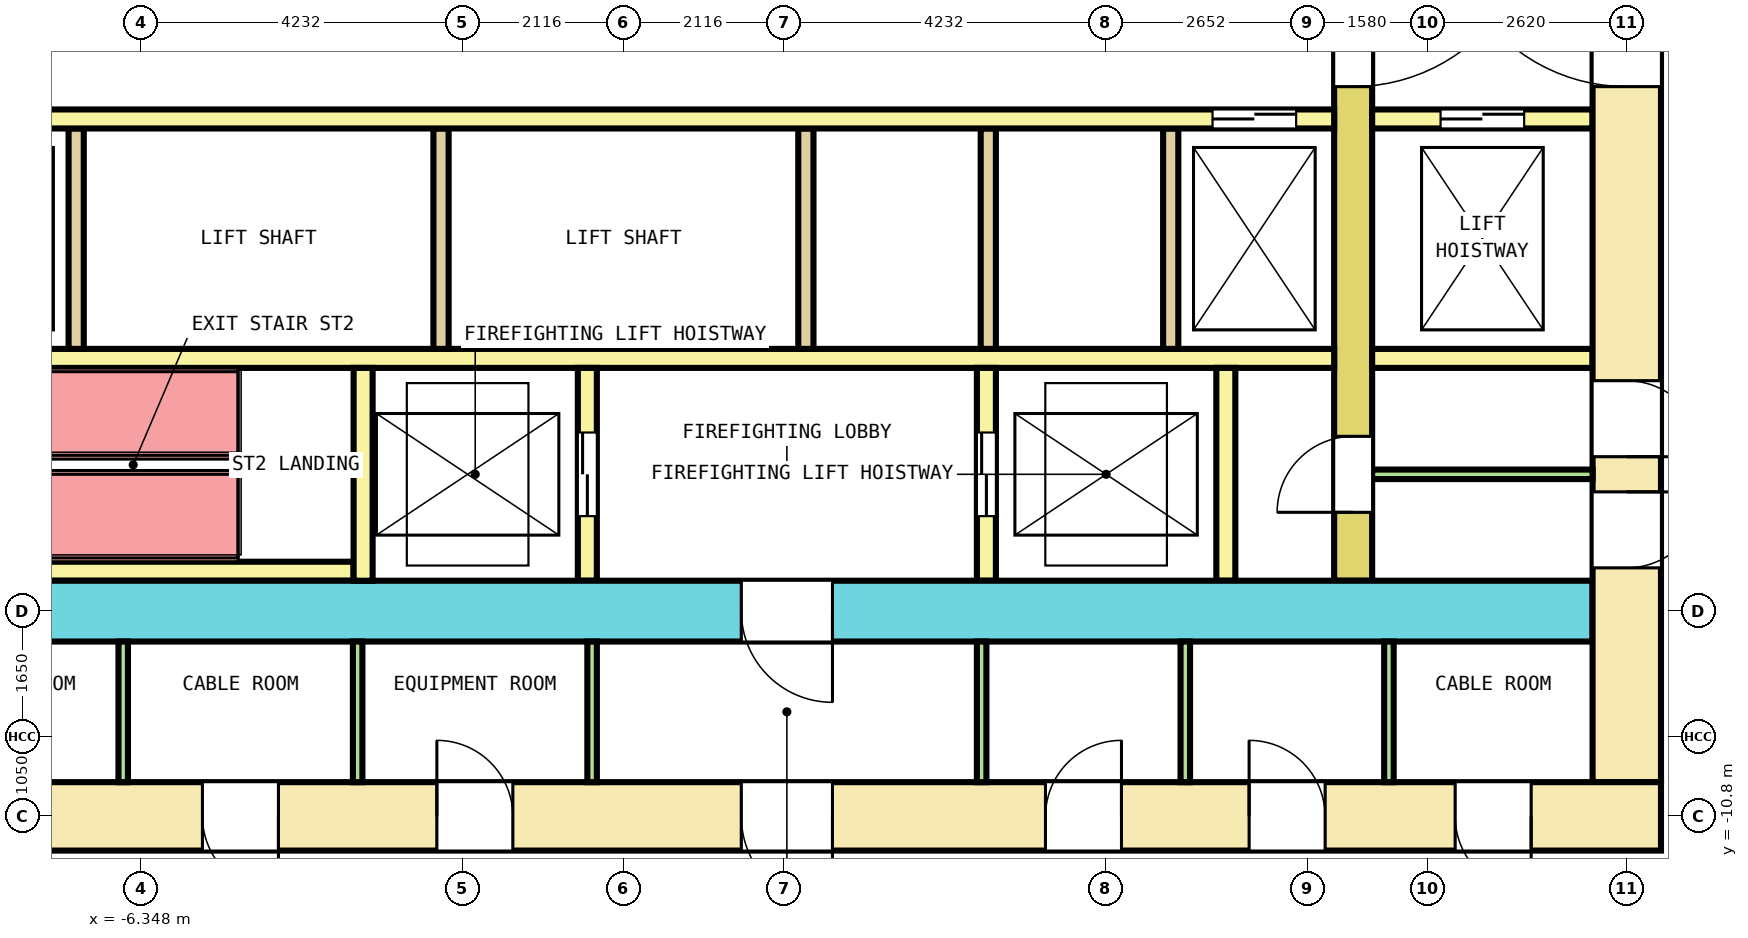
"""IFC4 building model, lengths in metres.
Left out: names, types, materials, properties, quantities, classifications, styles, units other than length and angle.
Written with IfcOpenShell. Run it as: python <this file> out.ifc"""

import sys

from ifc_helpers import new_model, si_unit, direction, frame, frame_2d, origin, place, context, subcontext, project, spatial, rectangle, extrude, element, fill, save


model = new_model("IFC4")
c1 = context("Model", 3, precision=1e-05, world=origin(), true_north=direction((0.0, 1.0)))
c2 = subcontext(c1, "Body", "Model", "MODEL_VIEW")
j1 = project(units=[si_unit("LENGTHUNIT", "METRE"), si_unit("PLANEANGLEUNIT", "RADIAN")], contexts=[c1])
p1 = place(None, origin())
s1 = spatial("IfcSite", under=j1, at=p1, CompositionType="ELEMENT")
p2 = place(p1, origin())
s2 = spatial("IfcBuilding", under=s1, at=p2, CompositionType="ELEMENT")
p3 = place(p2, frame((0.0, 0.0, 63.0)))
s3 = spatial("IfcBuildingStorey", under=s2, at=p3, CompositionType="ELEMENT", Elevation=63.0)
p4 = place(p3, frame((-13.65, -10.8, 0.0), z_axis=(0.0, 0.0, 1.0), x_axis=(1.0, 0.0, 0.0)))
e1 = element("IfcWall", 1, at=p4, inside=s3, PredefinedType="SHEAR", context=c2, shape_type="SweptSolid", body=[
    extrude(rectangle(XDim=27.3, YDim=0.9, at=frame_2d((13.65, 0.0))), origin(), (0.0, 0.0, 1.0), 4.1),
])
p5 = place(p4, frame((1.911, 0.0, 0.0)))
e2 = element("IfcOpeningElement", 2, at=p5, cuts=e1, PredefinedType="OPENING", context=c2, shape_type="SweptSolid", body=[
    extrude(rectangle(XDim=1.0, YDim=2.1, at=frame_2d((0.5, 1.05))), frame((0.0, 0.46, 0.0), z_axis=(0.0, -1.0, 0.0), x_axis=(1.0, 0.0, 0.0)), (0.0, 0.0, 1.0), 0.92),
])
p6 = place(p4, frame((5.027, 0.0, 0.0)))
e3 = element("IfcOpeningElement", 3, at=p6, cuts=e1, PredefinedType="OPENING", context=c2, shape_type="SweptSolid", body=[
    extrude(rectangle(XDim=1.0, YDim=2.1, at=frame_2d((0.5, 1.05))), frame((0.0, 0.46, 0.0), z_axis=(0.0, -1.0, 0.0), x_axis=(1.0, 0.0, 0.0)), (0.0, 0.0, 1.0), 0.92),
])
p7 = place(p4, frame((8.111, 0.0, 0.0)))
e4 = element("IfcOpeningElement", 4, at=p7, cuts=e1, PredefinedType="OPENING", context=c2, shape_type="SweptSolid", body=[
    extrude(rectangle(XDim=1.0, YDim=2.1, at=frame_2d((0.5, 1.05))), frame((0.0, 0.46, 0.0), z_axis=(0.0, -1.0, 0.0), x_axis=(1.0, 0.0, 0.0)), (0.0, 0.0, 1.0), 0.92),
])
p8 = place(p4, frame((11.195, 0.0, 0.0)))
e5 = element("IfcOpeningElement", 5, at=p8, cuts=e1, PredefinedType="OPENING", context=c2, shape_type="SweptSolid", body=[
    extrude(rectangle(XDim=1.0, YDim=2.1, at=frame_2d((0.5, 1.05))), frame((0.0, 0.46, 0.0), z_axis=(0.0, -1.0, 0.0), x_axis=(1.0, 0.0, 0.0)), (0.0, 0.0, 1.0), 0.92),
])
p9 = place(p4, frame((19.202, 0.0, 0.0)))
e6 = element("IfcOpeningElement", 6, at=p9, cuts=e1, PredefinedType="OPENING", context=c2, shape_type="SweptSolid", body=[
    extrude(rectangle(XDim=1.0, YDim=2.1, at=frame_2d((0.5, 1.05))), frame((0.0, 0.46, 0.0), z_axis=(0.0, -1.0, 0.0), x_axis=(1.0, 0.0, 0.0)), (0.0, 0.0, 1.0), 0.92),
])
p10 = place(p4, frame((21.881, 0.0, 0.0)))
e7 = element("IfcOpeningElement", 7, at=p10, cuts=e1, PredefinedType="OPENING", context=c2, shape_type="SweptSolid", body=[
    extrude(rectangle(XDim=1.0, YDim=2.1, at=frame_2d((0.5, 1.05))), frame((0.0, 0.46, 0.0), z_axis=(0.0, -1.0, 0.0), x_axis=(1.0, 0.0, 0.0)), (0.0, 0.0, 1.0), 0.92),
])
p11 = place(p4, frame((24.592, 0.0, 0.0)))
e8 = element("IfcOpeningElement", 8, at=p11, cuts=e1, PredefinedType="OPENING", context=c2, shape_type="SweptSolid", body=[
    extrude(rectangle(XDim=1.0, YDim=2.1, at=frame_2d((0.5, 1.05))), frame((0.0, 0.46, 0.0), z_axis=(0.0, -1.0, 0.0), x_axis=(1.0, 0.0, 0.0)), (0.0, 0.0, 1.0), 0.92),
])
p12 = place(p4, frame((15.2, 0.0, 0.0)))
e9 = element("IfcOpeningElement", 9, at=p12, cuts=e1, PredefinedType="OPENING", context=c2, shape_type="SweptSolid", body=[
    extrude(rectangle(XDim=1.2, YDim=2.1, at=frame_2d((0.6, 1.05))), frame((0.0, 0.46, 0.0), z_axis=(0.0, -1.0, 0.0), x_axis=(1.0, 0.0, 0.0)), (0.0, 0.0, 1.0), 0.92),
])
p13 = place(p3, frame((13.2, -10.35, 0.0), z_axis=(0.0, 0.0, 1.0), x_axis=(0.0, 1.0, 0.0)))
e10 = element("IfcWall", 10, at=p13, inside=s3, PredefinedType="SHEAR", context=c2, shape_type="SweptSolid", body=[
    extrude(rectangle(XDim=20.7, YDim=0.9, at=frame_2d((10.35, 0.0))), origin(), (0.0, 0.0, 1.0), 4.1),
])
p14 = place(p13, frame((9.15, 0.0, 0.0)))
e11 = element("IfcOpeningElement", 11, at=p14, cuts=e10, PredefinedType="OPENING", context=c2, shape_type="SweptSolid", body=[
    extrude(rectangle(XDim=2.4, YDim=2.1, at=frame_2d((1.2, 1.05))), frame((0.0, 0.46, 0.0), z_axis=(0.0, -1.0, 0.0), x_axis=(1.0, 0.0, 0.0)), (0.0, 0.0, 1.0), 0.92),
])
p15 = place(p13, frame((16.05, 0.0, 0.0)))
e12 = element("IfcOpeningElement", 12, at=p15, cuts=e10, PredefinedType="OPENING", context=c2, shape_type="SweptSolid", body=[
    extrude(rectangle(XDim=1.2, YDim=2.1, at=frame_2d((0.6, 1.05))), frame((0.0, 0.46, 0.0), z_axis=(0.0, -1.0, 0.0), x_axis=(1.0, 0.0, 0.0)), (0.0, 0.0, 1.0), 0.92),
])
p16 = place(p13, frame((2.819, 0.0, 0.0)))
e13 = element("IfcOpeningElement", 13, at=p16, cuts=e10, PredefinedType="OPENING", context=c2, shape_type="SweptSolid", body=[
    extrude(rectangle(XDim=1.0, YDim=2.1, at=frame_2d((0.5, 1.05))), frame((0.0, 0.46, 0.0), z_axis=(0.0, -1.0, 0.0), x_axis=(1.0, 0.0, 0.0)), (0.0, 0.0, 1.0), 0.92),
])
p17 = place(p13, frame((4.281, 0.0, 0.0)))
e14 = element("IfcOpeningElement", 14, at=p17, cuts=e10, PredefinedType="OPENING", context=c2, shape_type="SweptSolid", body=[
    extrude(rectangle(XDim=1.0, YDim=2.1, at=frame_2d((0.5, 1.05))), frame((0.0, 0.46, 0.0), z_axis=(0.0, -1.0, 0.0), x_axis=(1.0, 0.0, 0.0)), (0.0, 0.0, 1.0), 0.92),
])
p18 = place(p3, frame((-12.75, -8.1, 0.0), z_axis=(0.0, 0.0, 1.0), x_axis=(1.0, 0.0, 0.0)))
e15 = element("IfcWall", 15, at=p18, inside=s3, PredefinedType="SHEAR", context=c2, shape_type="SweptSolid", body=[
    extrude(rectangle(XDim=25.5, YDim=0.8, at=frame_2d((12.75, 0.0))), origin(), (0.0, 0.0, 1.0), 4.1),
])
p19 = place(p18, frame((14.3, 0.0, 0.0)))
e16 = element("IfcOpeningElement", 16, at=p19, cuts=e15, PredefinedType="OPENING", context=c2, shape_type="SweptSolid", body=[
    extrude(rectangle(XDim=1.2, YDim=2.1, at=frame_2d((0.6, 1.05))), frame((0.0, 0.41, 0.0), z_axis=(0.0, -1.0, 0.0), x_axis=(1.0, 0.0, 0.0)), (0.0, 0.0, 1.0), 0.82),
])
p20 = place(p3, frame((9.6, -7.7, 0.0), z_axis=(0.0, 0.0, 1.0), x_axis=(0.0, 1.0, 0.0)))
e17 = element("IfcWall", 17, at=p20, inside=s3, PredefinedType="SHEAR", context=c2, shape_type="SweptSolid", body=[
    extrude(rectangle(XDim=15.4, YDim=0.5, at=frame_2d((7.7, 0.0))), origin(), (0.0, 0.0, 1.0), 4.1),
])
p21 = place(p20, frame((6.5, 0.0, 0.0)))
e18 = element("IfcOpeningElement", 18, at=p21, cuts=e17, PredefinedType="OPENING", context=c2, shape_type="SweptSolid", body=[
    extrude(rectangle(XDim=2.4, YDim=2.1, at=frame_2d((1.2, 1.05))), frame((0.0, 0.26, 0.0), z_axis=(0.0, -1.0, 0.0), x_axis=(1.0, 0.0, 0.0)), (0.0, 0.0, 1.0), 0.52),
])
p22 = place(p20, frame((13.4, 0.0, 0.0)))
e19 = element("IfcOpeningElement", 19, at=p22, cuts=e17, PredefinedType="OPENING", context=c2, shape_type="SweptSolid", body=[
    extrude(rectangle(XDim=1.2, YDim=2.1, at=frame_2d((0.6, 1.05))), frame((0.0, 0.26, 0.0), z_axis=(0.0, -1.0, 0.0), x_axis=(1.0, 0.0, 0.0)), (0.0, 0.0, 1.0), 0.52),
])
p23 = place(p20, frame((0.9, 0.0, 0.0)))
e20 = element("IfcOpeningElement", 20, at=p23, cuts=e17, PredefinedType="OPENING", context=c2, shape_type="SweptSolid", body=[
    extrude(rectangle(XDim=1.0, YDim=2.1, at=frame_2d((0.5, 1.05))), frame((0.0, 0.26, 0.0), z_axis=(0.0, -1.0, 0.0), x_axis=(1.0, 0.0, 0.0)), (0.0, 0.0, 1.0), 0.52),
])
p24 = place(p3, frame((-9.35, -1.625, 0.0), z_axis=(0.0, 0.0, 1.0), x_axis=(1.0, 0.0, 0.0)))
e21 = element("IfcWall", 21, at=p24, inside=s3, PredefinedType="SOLIDWALL", context=c2, shape_type="SweptSolid", body=[
    extrude(rectangle(XDim=18.7, YDim=0.25, at=frame_2d((9.35, 0.0))), origin(), (0.0, 0.0, 1.0), 4.1),
])
p25 = place(p24, frame((0.5, 0.0, 0.0)))
e22 = element("IfcOpeningElement", 22, at=p25, cuts=e21, PredefinedType="OPENING", context=c2, shape_type="SweptSolid", body=[
    extrude(rectangle(XDim=1.1, YDim=2.1, at=frame_2d((0.55, 1.05))), frame((0.0, 0.135, 0.0), z_axis=(0.0, -1.0, 0.0), x_axis=(1.0, 0.0, 0.0)), (0.0, 0.0, 1.0), 0.27),
])
p26 = place(p24, frame((17.1, 0.0, 0.0)))
e23 = element("IfcOpeningElement", 23, at=p26, cuts=e21, PredefinedType="OPENING", context=c2, shape_type="SweptSolid", body=[
    extrude(rectangle(XDim=1.1, YDim=2.1, at=frame_2d((0.55, 1.05))), frame((0.0, 0.135, 0.0), z_axis=(0.0, -1.0, 0.0), x_axis=(1.0, 0.0, 0.0)), (0.0, 0.0, 1.0), 0.27),
])
p27 = place(p3, frame((9.85, -1.625, 0.0), z_axis=(0.0, 0.0, 1.0), x_axis=(1.0, 0.0, 0.0)))
e24 = element("IfcWall", 24, at=p27, inside=s3, PredefinedType="SOLIDWALL", context=c2, shape_type="SweptSolid", body=[
    extrude(rectangle(XDim=2.9, YDim=0.25, at=frame_2d((1.45, 0.0))), origin(), (0.0, 0.0, 1.0), 4.1),
])
p28 = place(p27, frame((0.9, 0.0, 0.0)))
e25 = element("IfcOpeningElement", 25, at=p28, cuts=e24, PredefinedType="OPENING", context=c2, shape_type="SweptSolid", body=[
    extrude(rectangle(XDim=1.1, YDim=2.1, at=frame_2d((0.55, 1.05))), frame((0.0, 0.135, 0.0), z_axis=(0.0, -1.0, 0.0), x_axis=(1.0, 0.0, 0.0)), (0.0, 0.0, 1.0), 0.27),
])
p29 = place(p3, frame((-9.35, -4.775, 0.0), z_axis=(0.0, 0.0, 1.0), x_axis=(1.0, 0.0, 0.0)))
e26 = element("IfcWall", 26, at=p29, inside=s3, PredefinedType="SOLIDWALL", context=c2, shape_type="SweptSolid", body=[
    extrude(rectangle(XDim=18.7, YDim=0.25, at=frame_2d((9.35, 0.0))), origin(), (0.0, 0.0, 1.0), 4.1),
])
p30 = place(p3, frame((9.85, -4.775, 0.0), z_axis=(0.0, 0.0, 1.0), x_axis=(1.0, 0.0, 0.0)))
e27 = element("IfcWall", 27, at=p30, inside=s3, PredefinedType="SOLIDWALL", context=c2, shape_type="SweptSolid", body=[
    extrude(rectangle(XDim=2.9, YDim=0.25, at=frame_2d((1.45, 0.0))), origin(), (0.0, 0.0, 1.0), 4.1),
])
for number, where, z_axis, x_axis in (
    (28, (-7.2, -4.65, 0.0), (0.0, 0.0, 1.0), (0.0, 1.0, 0.0)),
    (29, (-2.4, -4.65, 0.0), (0.0, 0.0, 1.0), (0.0, 1.0, 0.0)),
    (30, (2.4, -4.65, 0.0), (0.0, 0.0, 1.0), (0.0, 1.0, 0.0)),
    (31, (4.8, -4.65, 0.0), (0.0, 0.0, 1.0), (0.0, 1.0, 0.0)),
    (32, (7.2, -4.65, 0.0), (0.0, 0.0, 1.0), (0.0, 1.0, 0.0)),
):
    element("IfcWall", number, at=place(p3, frame(where, z_axis=z_axis, x_axis=x_axis)), inside=s3, PredefinedType="SOLIDWALL", context=c2, shape_type="SweptSolid", body=[
        extrude(rectangle(XDim=2.9, YDim=0.2, at=frame_2d((1.45, 0.0))), origin(), (0.0, 0.0, 1.0), 4.1),
    ])
p31 = place(p3, frame((-9.35, -7.575, 0.0), z_axis=(0.0, 0.0, 1.0), x_axis=(1.0, 0.0, 0.0)))
e33 = element("IfcWall", 33, at=p31, inside=s3, PredefinedType="SOLIDWALL", context=c2, shape_type="SweptSolid", body=[
    extrude(rectangle(XDim=5.8, YDim=0.25, at=frame_2d((2.9, 0.0))), origin(), (0.0, 0.0, 1.0), 4.1),
])
p32 = place(p3, frame((-3.425, -7.7, 0.0), z_axis=(0.0, 0.0, 1.0), x_axis=(0.0, 1.0, 0.0)))
e34 = element("IfcWall", 34, at=p32, inside=s3, PredefinedType="SOLIDWALL", context=c2, shape_type="SweptSolid", body=[
    extrude(rectangle(XDim=2.8, YDim=0.25, at=frame_2d((1.4, 0.0))), origin(), (0.0, 0.0, 1.0), 4.1),
])
p33 = place(p3, frame((-0.475, -7.7, 0.0), z_axis=(0.0, 0.0, 1.0), x_axis=(0.0, 1.0, 0.0)))
e35 = element("IfcWall", 35, at=p33, inside=s3, PredefinedType="SOLIDWALL", context=c2, shape_type="SweptSolid", body=[
    extrude(rectangle(XDim=2.8, YDim=0.25, at=frame_2d((1.4, 0.0))), origin(), (0.0, 0.0, 1.0), 4.1),
])
p34 = place(p33, frame((0.85, 0.0, 0.0)))
e36 = element("IfcOpeningElement", 36, at=p34, cuts=e35, PredefinedType="OPENING", context=c2, shape_type="SweptSolid", body=[
    extrude(rectangle(XDim=1.1, YDim=2.1, at=frame_2d((0.55, 1.05))), frame((0.0, 0.135, 0.0), z_axis=(0.0, -1.0, 0.0), x_axis=(1.0, 0.0, 0.0)), (0.0, 0.0, 1.0), 0.27),
])
p35 = place(p3, frame((4.775, -7.7, 0.0), z_axis=(0.0, 0.0, 1.0), x_axis=(0.0, 1.0, 0.0)))
e37 = element("IfcWall", 37, at=p35, inside=s3, PredefinedType="SOLIDWALL", context=c2, shape_type="SweptSolid", body=[
    extrude(rectangle(XDim=2.8, YDim=0.25, at=frame_2d((1.4, 0.0))), origin(), (0.0, 0.0, 1.0), 4.1),
])
p36 = place(p35, frame((0.85, 0.0, 0.0)))
e38 = element("IfcOpeningElement", 38, at=p36, cuts=e37, PredefinedType="OPENING", context=c2, shape_type="SweptSolid", body=[
    extrude(rectangle(XDim=1.1, YDim=2.1, at=frame_2d((0.55, 1.05))), frame((0.0, 0.135, 0.0), z_axis=(0.0, -1.0, 0.0), x_axis=(1.0, 0.0, 0.0)), (0.0, 0.0, 1.0), 0.27),
])
p37 = place(p3, frame((7.925, -7.7, 0.0), z_axis=(0.0, 0.0, 1.0), x_axis=(0.0, 1.0, 0.0)))
e39 = element("IfcWall", 39, at=p37, inside=s3, PredefinedType="SOLIDWALL", context=c2, shape_type="SweptSolid", body=[
    extrude(rectangle(XDim=2.8, YDim=0.25, at=frame_2d((1.4, 0.0))), origin(), (0.0, 0.0, 1.0), 4.1),
])
p38 = place(p3, frame((9.85, -6.3, 0.0), z_axis=(0.0, 0.0, 1.0), x_axis=(1.0, 0.0, 0.0)))
e40 = element("IfcWall", 40, at=p38, inside=s3, PredefinedType="PARTITIONING", context=c2, shape_type="SweptSolid", body=[
    extrude(rectangle(XDim=2.9, YDim=0.125, at=frame_2d((1.45, 0.0))), origin(), (0.0, 0.0, 1.0), 4.1),
])
for number, where, z_axis, x_axis in (
    (41, (-6.581, -10.35, 0.0), (0.0, 0.0, 1.0), (0.0, 1.0, 0.0)),
    (42, (-3.497, -10.35, 0.0), (0.0, 0.0, 1.0), (0.0, 1.0, 0.0)),
    (43, (-0.413, -10.35, 0.0), (0.0, 0.0, 1.0), (0.0, 1.0, 0.0)),
    (44, (4.712, -10.35, 0.0), (0.0, 0.0, 1.0), (0.0, 1.0, 0.0)),
    (45, (7.392, -10.35, 0.0), (0.0, 0.0, 1.0), (0.0, 1.0, 0.0)),
    (46, (10.071, -10.35, 0.0), (0.0, 0.0, 1.0), (0.0, 1.0, 0.0)),
):
    element("IfcWall", number, at=place(p3, frame(where, z_axis=z_axis, x_axis=x_axis)), inside=s3, PredefinedType="PARTITIONING", context=c2, shape_type="SweptSolid", body=[
        extrude(rectangle(XDim=1.85, YDim=0.125, at=frame_2d((0.925, 0.0))), origin(), (0.0, 0.0, 1.0), 4.1),
    ])
p39 = place(p26, origin())
e47 = element("IfcDoor", 47, at=p39, inside=s3, OperationType="DOUBLE_DOOR_SLIDING", PredefinedType="DOOR", context=c2, shape_type="SweptSolid", body=[
    extrude(rectangle(XDim=1.1, YDim=2.1, at=frame_2d((0.55, 1.05))), frame((0.0, 0.075, 0.0), z_axis=(0.0, -1.0, 0.0), x_axis=(1.0, 0.0, 0.0)), (0.0, 0.0, 1.0), 0.15),
])
fill(e23, e47)
p40 = place(p28, origin())
e48 = element("IfcDoor", 48, at=p40, inside=s3, OperationType="DOUBLE_DOOR_SLIDING", PredefinedType="DOOR", context=c2, shape_type="SweptSolid", body=[
    extrude(rectangle(XDim=1.1, YDim=2.1, at=frame_2d((0.55, 1.05))), frame((0.0, 0.075, 0.0), z_axis=(0.0, -1.0, 0.0), x_axis=(1.0, 0.0, 0.0)), (0.0, 0.0, 1.0), 0.15),
])
fill(e25, e48)
p41 = place(p34, origin())
e49 = element("IfcDoor", 49, at=p41, inside=s3, OperationType="DOUBLE_DOOR_SLIDING", PredefinedType="DOOR", context=c2, shape_type="SweptSolid", body=[
    extrude(rectangle(XDim=1.1, YDim=2.1, at=frame_2d((0.55, 1.05))), frame((0.0, 0.075, 0.0), z_axis=(0.0, -1.0, 0.0), x_axis=(1.0, 0.0, 0.0)), (0.0, 0.0, 1.0), 0.15),
])
fill(e36, e49)
p42 = place(p36, origin())
e50 = element("IfcDoor", 50, at=p42, inside=s3, OperationType="DOUBLE_DOOR_SLIDING", PredefinedType="DOOR", context=c2, shape_type="SweptSolid", body=[
    extrude(rectangle(XDim=1.1, YDim=2.1, at=frame_2d((0.55, 1.05))), frame((0.0, 0.075, 0.0), z_axis=(0.0, -1.0, 0.0), x_axis=(1.0, 0.0, 0.0)), (0.0, 0.0, 1.0), 0.15),
])
fill(e38, e50)
p43 = place(p21, origin())
e51 = element("IfcDoor", 51, at=p43, inside=s3, OperationType="DOUBLE_DOOR_SINGLE_SWING", PredefinedType="DOOR", context=c2, shape_type="SweptSolid", body=[
    extrude(rectangle(XDim=2.4, YDim=2.1, at=frame_2d((1.2, 1.05))), frame((0.0, 0.2, 0.0), z_axis=(0.0, -1.0, 0.0), x_axis=(1.0, 0.0, 0.0)), (0.0, 0.0, 1.0), 0.4),
])
fill(e18, e51)
p44 = place(p14, origin())
e52 = element("IfcDoor", 52, at=p44, inside=s3, OperationType="DOUBLE_DOOR_SINGLE_SWING", PredefinedType="DOOR", context=c2, shape_type="SweptSolid", body=[
    extrude(rectangle(XDim=2.4, YDim=2.1, at=frame_2d((1.2, 1.05))), frame((0.0, 0.3, 0.0), z_axis=(0.0, -1.0, 0.0), x_axis=(1.0, 0.0, 0.0)), (0.0, 0.0, 1.0), 0.6),
])
fill(e11, e52)
p45 = place(p19, origin())
e53 = element("IfcDoor", 53, at=p45, inside=s3, OperationType="SINGLE_SWING_LEFT", PredefinedType="DOOR", context=c2, shape_type="SweptSolid", body=[
    extrude(rectangle(XDim=1.2, YDim=2.1, at=frame_2d((0.6, 1.05))), frame((0.0, 0.3, 0.0), z_axis=(0.0, -1.0, 0.0), x_axis=(1.0, 0.0, 0.0)), (0.0, 0.0, 1.0), 0.6),
])
fill(e16, e53)
p46 = place(p23, origin())
e54 = element("IfcDoor", 54, at=p46, inside=s3, OperationType="SINGLE_SWING_LEFT", PredefinedType="DOOR", context=c2, shape_type="SweptSolid", body=[
    extrude(rectangle(XDim=1.0, YDim=2.1, at=frame_2d((0.5, 1.05))), frame((0.0, 0.2, 0.0), z_axis=(0.0, -1.0, 0.0), x_axis=(1.0, 0.0, 0.0)), (0.0, 0.0, 1.0), 0.4),
])
fill(e20, e54)
p47 = place(p16, origin())
e55 = element("IfcDoor", 55, at=p47, inside=s3, OperationType="SINGLE_SWING_RIGHT", PredefinedType="DOOR", context=c2, shape_type="SweptSolid", body=[
    extrude(rectangle(XDim=1.0, YDim=2.1, at=frame_2d((0.5, 1.05))), frame((0.0, 0.3, 0.0), z_axis=(0.0, -1.0, 0.0), x_axis=(1.0, 0.0, 0.0)), (0.0, 0.0, 1.0), 0.6),
])
fill(e13, e55)
p48 = place(p17, origin())
e56 = element("IfcDoor", 56, at=p48, inside=s3, OperationType="SINGLE_SWING_LEFT", PredefinedType="DOOR", context=c2, shape_type="SweptSolid", body=[
    extrude(rectangle(XDim=1.0, YDim=2.1, at=frame_2d((0.5, 1.05))), frame((0.0, 0.3, 0.0), z_axis=(0.0, -1.0, 0.0), x_axis=(1.0, 0.0, 0.0)), (0.0, 0.0, 1.0), 0.6),
])
fill(e14, e56)
p49 = place(p7, origin())
e57 = element("IfcDoor", 57, at=p49, inside=s3, OperationType="SINGLE_SWING_LEFT", PredefinedType="DOOR", context=c2, shape_type="SweptSolid", body=[
    extrude(rectangle(XDim=1.0, YDim=2.1, at=frame_2d((0.5, 1.05))), frame((0.0, 0.3, 0.0), z_axis=(0.0, -1.0, 0.0), x_axis=(1.0, 0.0, 0.0)), (0.0, 0.0, 1.0), 0.6),
])
fill(e4, e57)
p50 = place(p8, origin())
e58 = element("IfcDoor", 58, at=p50, inside=s3, OperationType="SINGLE_SWING_RIGHT", PredefinedType="DOOR", context=c2, shape_type="SweptSolid", body=[
    extrude(rectangle(XDim=1.0, YDim=2.1, at=frame_2d((0.5, 1.05))), frame((0.0, 0.3, 0.0), z_axis=(0.0, -1.0, 0.0), x_axis=(1.0, 0.0, 0.0)), (0.0, 0.0, 1.0), 0.6),
])
fill(e5, e58)
p51 = place(p9, origin())
e59 = element("IfcDoor", 59, at=p51, inside=s3, OperationType="SINGLE_SWING_LEFT", PredefinedType="DOOR", context=c2, shape_type="SweptSolid", body=[
    extrude(rectangle(XDim=1.0, YDim=2.1, at=frame_2d((0.5, 1.05))), frame((0.0, 0.3, 0.0), z_axis=(0.0, -1.0, 0.0), x_axis=(1.0, 0.0, 0.0)), (0.0, 0.0, 1.0), 0.6),
])
fill(e6, e59)
p52 = place(p10, origin())
e60 = element("IfcDoor", 60, at=p52, inside=s3, OperationType="SINGLE_SWING_RIGHT", PredefinedType="DOOR", context=c2, shape_type="SweptSolid", body=[
    extrude(rectangle(XDim=1.0, YDim=2.1, at=frame_2d((0.5, 1.05))), frame((0.0, 0.3, 0.0), z_axis=(0.0, -1.0, 0.0), x_axis=(1.0, 0.0, 0.0)), (0.0, 0.0, 1.0), 0.6),
])
fill(e7, e60)
p53 = place(p11, origin())
e61 = element("IfcDoor", 61, at=p53, inside=s3, OperationType="SINGLE_SWING_LEFT", PredefinedType="DOOR", context=c2, shape_type="SweptSolid", body=[
    extrude(rectangle(XDim=1.0, YDim=2.1, at=frame_2d((0.5, 1.05))), frame((0.0, 0.3, 0.0), z_axis=(0.0, -1.0, 0.0), x_axis=(1.0, 0.0, 0.0)), (0.0, 0.0, 1.0), 0.6),
])
fill(e8, e61)
p54 = place(p12, origin())
e62 = element("IfcDoor", 62, at=p54, inside=s3, OperationType="SINGLE_SWING_RIGHT", PredefinedType="DOOR", context=c2, shape_type="SweptSolid", body=[
    extrude(rectangle(XDim=1.2, YDim=2.1, at=frame_2d((0.6, 1.05))), frame((0.0, 0.3, 0.0), z_axis=(0.0, -1.0, 0.0), x_axis=(1.0, 0.0, 0.0)), (0.0, 0.0, 1.0), 0.6),
])
fill(e9, e62)
save(model, sys.argv[1])
